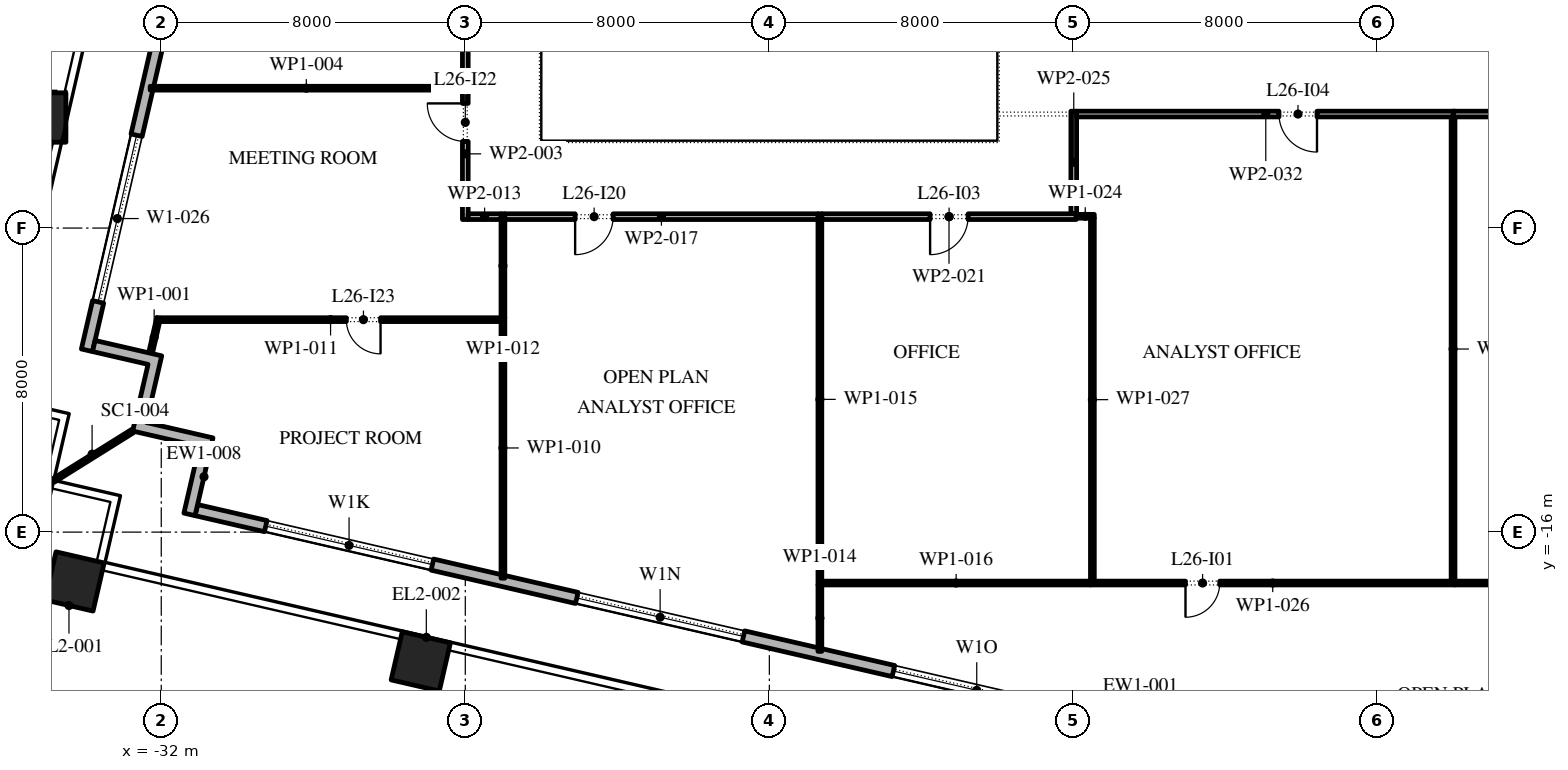
"""IFC4 building model, lengths in metres.
Left out: names, types, materials, properties, quantities, classifications, styles, units other than length and angle.
Written with IfcOpenShell. Run it as: python <this file> out.ifc"""

import sys

from ifc_helpers import new_model, si_unit, direction, frame, frame_2d, origin, origin_2d, place, context, subcontext, project, spatial, polyline, rectangle, outline, extrude, element, fill, save


model = new_model("IFC4")
c1 = context("Model", 3, precision=1e-05, world=origin(), true_north=direction((0.0, 1.0)))
c2 = subcontext(c1, "Body", "Model", "MODEL_VIEW")
j1 = project(units=[si_unit("LENGTHUNIT", "METRE"), si_unit("PLANEANGLEUNIT", "RADIAN")], contexts=[c1])
p1 = place(None, origin())
s1 = spatial("IfcSite", under=j1, at=p1, CompositionType="ELEMENT")
p2 = place(p1, origin())
s2 = spatial("IfcBuilding", under=s1, at=p2, CompositionType="ELEMENT")
p3 = place(p2, frame((0.0, 0.0, 122.4)))
s3 = spatial("IfcBuildingStorey", under=s2, at=p3, CompositionType="ELEMENT", Elevation=122.4)
for number, where, z_axis, x_axis in (
    (1, (-34.282, -17.298, 0.0), (0.0, 0.0, 1.0), (0.974, -0.225, 0.0)),
    (2, (-25.172, -19.402, 0.0), (0.0, 0.0, 1.0), (0.974, -0.225, 0.0)),
):
    element("IfcColumn", number, at=place(p3, frame(where, z_axis=z_axis, x_axis=x_axis)), inside=s3, PredefinedType="COLUMN", context=c2, shape_type="SweptSolid", body=[
        extrude(rectangle(XDim=1.3, YDim=1.3, at=origin_2d()), origin(), (0.0, 0.0, 1.0), 4.2),
    ])
p4 = place(p3, frame((-35.159, -5.092, 0.0), z_axis=(0.00290605529, 0.012670401066, 0.99991550432), x_axis=(-0.974691740237, 0.22355315143, 0.0)))
e3 = element("IfcColumn", 3, at=p4, inside=s3, PredefinedType="COLUMN", context=c2, shape_type="SweptSolid", body=[
    extrude(rectangle(XDim=1.3, YDim=1.3, at=origin_2d()), origin(), (0.0, 0.0, 1.0), 4.2),
])
p5 = place(p3, frame((-35.631, -15.139, 0.0), z_axis=(0.0, 0.0, 1.0), x_axis=(0.974370064785, -0.224951054344, 0.0)))
e4 = element("IfcColumn", 4, at=p5, inside=s3, PredefinedType="COLUMN", context=c2, shape_type="SweptSolid", body=[
    extrude(rectangle(XDim=1.3, YDim=1.3, at=origin_2d()), origin(), (0.0, 0.0, 1.0), 4.2),
])
p6 = place(p3, frame((-31.078, -15.421, 0.0), z_axis=(0.0, 0.0, 1.0), x_axis=(0.974370456532, -0.224949357493, 0.0)))
e5 = element("IfcWall", 5, at=p6, inside=s3, PredefinedType="STANDARD", context=c2, shape_type="SweptSolid", body=[
    extrude(rectangle(XDim=51.0, YDim=0.3, at=frame_2d((25.5, 0.0))), origin(), (0.0, 0.0, 1.0), 4.0),
])
p7 = place(p6, frame((1.875, 0.0, 0.45)))
e6 = element("IfcOpeningElement", 6, at=p7, cuts=e5, PredefinedType="OPENING", context=c2, shape_type="SweptSolid", body=[
    extrude(rectangle(XDim=4.5, YDim=2.65, at=frame_2d((2.25, 1.325))), frame((0.0, 0.16, 0.0), z_axis=(0.0, -1.0, 0.0), x_axis=(1.0, 0.0, 0.0)), (0.0, 0.0, 1.0), 0.32),
])
p8 = place(p6, frame((10.275, 0.0, 0.45)))
e7 = element("IfcOpeningElement", 7, at=p8, cuts=e5, PredefinedType="OPENING", context=c2, shape_type="SweptSolid", body=[
    extrude(rectangle(XDim=4.5, YDim=2.525, at=frame_2d((2.25, 1.262))), frame((0.0, 0.16, 0.0), z_axis=(0.0, -1.0, 0.0), x_axis=(1.0, 0.0, 0.0)), (0.0, 0.0, 1.0), 0.32),
])
p9 = place(p6, frame((18.825, 0.0, 0.45)))
e8 = element("IfcOpeningElement", 8, at=p9, cuts=e5, PredefinedType="OPENING", context=c2, shape_type="SweptSolid", body=[
    extrude(rectangle(XDim=4.5, YDim=2.5, at=frame_2d((2.25, 1.25))), frame((0.0, 0.16, 0.0), z_axis=(0.0, -1.0, 0.0), x_axis=(1.0, 0.0, 0.0)), (0.0, 0.0, 1.0), 0.32),
])
p10 = place(p6, frame((28.425, 0.0, 0.0)))
e9 = element("IfcOpeningElement", 9, at=p10, cuts=e5, PredefinedType="OPENING", context=c2, shape_type="SweptSolid", body=[
    extrude(rectangle(XDim=2.4, YDim=2.9, at=frame_2d((1.2, 1.45))), frame((0.0, 0.16, 0.0), z_axis=(0.0, -1.0, 0.0), x_axis=(1.0, 0.0, 0.0)), (0.0, 0.0, 1.0), 0.32),
])
p11 = place(p6, frame((35.925, 0.0, 0.45)))
e10 = element("IfcOpeningElement", 10, at=p11, cuts=e5, PredefinedType="OPENING", context=c2, shape_type="SweptSolid", body=[
    extrude(rectangle(XDim=4.5, YDim=2.45, at=frame_2d((2.25, 1.225))), frame((0.0, 0.16, 0.0), z_axis=(0.0, -1.0, 0.0), x_axis=(1.0, 0.0, 0.0)), (0.0, 0.0, 1.0), 0.32),
])
p12 = place(p6, frame((44.475, 0.0, 0.45)))
e11 = element("IfcOpeningElement", 11, at=p12, cuts=e5, PredefinedType="OPENING", context=c2, shape_type="SweptSolid", body=[
    extrude(rectangle(XDim=4.5, YDim=2.45, at=frame_2d((2.25, 1.225))), frame((0.0, 0.16, 0.0), z_axis=(0.0, -1.0, 0.0), x_axis=(1.0, 0.0, 0.0)), (0.0, 0.0, 1.0), 0.32),
])
p13 = place(p3, frame((-22.82, 37.016, 0.0), z_axis=(0.0, 0.0, 1.0), x_axis=(-0.224953880882, -0.974369412223, 0.0)))
e12 = element("IfcWall", 12, at=p13, inside=s3, PredefinedType="STANDARD", context=c2, shape_type="SweptSolid", body=[
    extrude(rectangle(XDim=49.5, YDim=0.3, at=frame_2d((24.75, 0.0))), origin(), (0.0, 0.0, 1.0), 4.0),
])
p14 = place(p13, frame((1.157, 0.0, 0.45)))
e13 = element("IfcOpeningElement", 13, at=p14, cuts=e12, PredefinedType="OPENING", context=c2, shape_type="SweptSolid", body=[
    extrude(rectangle(XDim=4.5, YDim=3.05, at=frame_2d((2.25, 1.525))), frame((0.0, 0.16, 0.0), z_axis=(0.0, -1.0, 0.0), x_axis=(1.0, 0.0, 0.0)), (0.0, 0.0, 1.0), 0.32),
])
p15 = place(p13, frame((8.121, 0.0, 0.45)))
e14 = element("IfcOpeningElement", 14, at=p15, cuts=e12, PredefinedType="OPENING", context=c2, shape_type="SweptSolid", body=[
    extrude(rectangle(XDim=4.5, YDim=3.05, at=frame_2d((2.25, 1.525))), frame((0.0, 0.16, 0.0), z_axis=(0.0, -1.0, 0.0), x_axis=(1.0, 0.0, 0.0)), (0.0, 0.0, 1.0), 0.32),
])
p16 = place(p13, frame((15.236, 0.0, 0.45)))
e15 = element("IfcOpeningElement", 15, at=p16, cuts=e12, PredefinedType="OPENING", context=c2, shape_type="SweptSolid", body=[
    extrude(rectangle(XDim=4.5, YDim=3.05, at=frame_2d((2.25, 1.525))), frame((0.0, 0.16, 0.0), z_axis=(0.0, -1.0, 0.0), x_axis=(1.0, 0.0, 0.0)), (0.0, 0.0, 1.0), 0.32),
])
p17 = place(p13, frame((23.4, 0.0, 0.0)))
e16 = element("IfcOpeningElement", 16, at=p17, cuts=e12, PredefinedType="OPENING", context=c2, shape_type="SweptSolid", body=[
    extrude(rectangle(XDim=2.4, YDim=3.5, at=frame_2d((1.2, 1.75))), frame((0.0, 0.16, 0.0), z_axis=(0.0, -1.0, 0.0), x_axis=(1.0, 0.0, 0.0)), (0.0, 0.0, 1.0), 0.32),
])
p18 = place(p13, frame((29.464, 0.0, 0.45)))
e17 = element("IfcOpeningElement", 17, at=p18, cuts=e12, PredefinedType="OPENING", context=c2, shape_type="SweptSolid", body=[
    extrude(rectangle(XDim=4.5, YDim=2.875, at=frame_2d((2.25, 1.438))), frame((0.0, 0.16, 0.0), z_axis=(0.0, -1.0, 0.0), x_axis=(1.0, 0.0, 0.0)), (0.0, 0.0, 1.0), 0.32),
])
p19 = place(p13, frame((36.579, 0.0, 0.45)))
e18 = element("IfcOpeningElement", 18, at=p19, cuts=e12, PredefinedType="OPENING", context=c2, shape_type="SweptSolid", body=[
    extrude(rectangle(XDim=4.5, YDim=2.675, at=frame_2d((2.25, 1.337))), frame((0.0, 0.16, 0.0), z_axis=(0.0, -1.0, 0.0), x_axis=(1.0, 0.0, 0.0)), (0.0, 0.0, 1.0), 0.32),
])
p20 = place(p13, frame((43.693, 0.0, 0.45)))
e19 = element("IfcOpeningElement", 19, at=p20, cuts=e12, PredefinedType="OPENING", context=c2, shape_type="SweptSolid", body=[
    extrude(rectangle(XDim=4.5, YDim=3.05, at=frame_2d((2.25, 1.525))), frame((0.0, 0.16, 0.0), z_axis=(0.0, -1.0, 0.0), x_axis=(1.0, 0.0, 0.0)), (0.0, 0.0, 1.0), 0.32),
])
p21 = place(p3, origin())
e20 = element("IfcWall", 20, at=p21, inside=s3, PredefinedType="STANDARD", context=c2, shape_type="SweptSolid", body=[
    extrude(outline(polyline([(-32.393, -13.116), (-30.639, -13.521), (-31.111, -15.567), (-31.404, -15.5), (-30.999, -13.746), (-32.753, -13.341), (-32.348, -11.587), (-33.809, -11.25), (-33.742, -10.957), (-31.988, -11.362), (-32.393, -13.116)])), origin(), (0.0, 0.0, 1.0), 4.0),
])
p22 = place(p3, frame((-32.753, -13.341, -0.05), z_axis=(0.0, 0.0, 1.0), x_axis=(-0.848059759764, -0.529900598103, 0.0)))
e21 = element("IfcWall", 21, at=p22, inside=s3, PredefinedType="STANDARD", context=c2, shape_type="SweptSolid", body=[
    extrude(rectangle(XDim=2.455, YDim=0.1, at=frame_2d((1.228, 0.0))), origin(), (0.0, 0.0, 1.0), 4.05),
])
p23 = place(p3, frame((-32.069, -10.361, 0.0), z_axis=(0.0, 0.0, 1.0), x_axis=(-0.222987762652, -0.974821243976, 0.0)))
e22 = element("IfcWall", 22, at=p23, inside=s3, PredefinedType="PARTITIONING", context=c2, shape_type="SweptSolid", body=[
    extrude(rectangle(XDim=1.058, YDim=0.1, at=frame_2d((0.529, 0.0))), origin(), (0.0, 0.0, 1.0), 4.0),
])
p24 = place(p3, frame((-24.0, -7.775, 0.0), z_axis=(0.0, 0.0, 1.0), x_axis=(0.0, 1.0, 0.0)))
e23 = element("IfcWall", 23, at=p24, inside=s3, PredefinedType="PARTITIONING", context=c2, shape_type="SweptSolid", body=[
    extrude(rectangle(XDim=3.455, YDim=0.15, at=frame_2d((1.728, 0.0))), origin(), (0.0, 0.0, 1.0), 4.0),
])
p25 = place(p24, frame((2.055, 0.0, 0.0)))
e24 = element("IfcOpeningElement", 24, at=p25, cuts=e23, PredefinedType="OPENING", context=c2, shape_type="SweptSolid", body=[
    extrude(rectangle(XDim=1.0, YDim=2.1, at=frame_2d((0.5, 1.05))), frame((0.0, 0.085, 0.0), z_axis=(0.0, -1.0, 0.0), x_axis=(1.0, 0.0, 0.0)), (0.0, 0.0, 1.0), 0.17),
])
p26 = place(p3, frame((-24.075, -4.32, 0.0), z_axis=(0.0, 0.0, 1.0), x_axis=(-1.0, 0.0, 0.0)))
e25 = element("IfcWall", 25, at=p26, inside=s3, PredefinedType="PARTITIONING", context=c2, shape_type="SweptSolid", body=[
    extrude(rectangle(XDim=8.217, YDim=0.1, at=frame_2d((4.108, 0.0))), origin(), (0.0, 0.0, 1.0), 4.0),
])
p27 = place(p3, frame((-24.0, -4.32, 0.0), z_axis=(0.0, 0.0, 1.0), x_axis=(0.0, 1.0, 0.0)))
e26 = element("IfcWall", 26, at=p27, inside=s3, PredefinedType="PARTITIONING", context=c2, shape_type="SweptSolid", body=[
    extrude(rectangle(XDim=7.82, YDim=0.15, at=frame_2d((3.91, 0.0))), origin(), (0.0, 0.0, 1.0), 4.0),
])
p28 = place(p27, frame((4.12, 0.0, 0.0)))
e27 = element("IfcOpeningElement", 27, at=p28, cuts=e26, PredefinedType="OPENING", context=c2, shape_type="SweptSolid", body=[
    extrude(rectangle(XDim=1.0, YDim=2.1, at=frame_2d((0.5, 1.05))), frame((0.0, 0.085, 0.0), z_axis=(0.0, -1.0, 0.0), x_axis=(1.0, 0.0, 0.0)), (0.0, 0.0, 1.0), 0.17),
])
p29 = place(p3, frame((-23.01, -17.212, 0.0), z_axis=(0.0, 0.0, 1.0), x_axis=(0.0, 1.0, 0.0)))
e28 = element("IfcWall", 28, at=p29, inside=s3, PredefinedType="PARTITIONING", context=c2, shape_type="SweptSolid", body=[
    extrude(rectangle(XDim=6.852, YDim=0.1, at=frame_2d((3.426, 0.0))), origin(), (0.0, 0.0, 1.0), 4.0),
])
p30 = place(p3, frame((-23.06, -10.41, 0.0), z_axis=(0.0, 0.0, 1.0), x_axis=(-1.0, 0.0, 0.0)))
e29 = element("IfcWall", 29, at=p30, inside=s3, PredefinedType="PARTITIONING", context=c2, shape_type="SweptSolid", body=[
    extrude(rectangle(XDim=8.97, YDim=0.1, at=frame_2d((4.485, 0.0))), origin(), (0.0, 0.0, 1.0), 4.0),
])
p31 = place(p30, frame((3.17, 0.0, 0.0)))
e30 = element("IfcOpeningElement", 30, at=p31, cuts=e29, PredefinedType="OPENING", context=c2, shape_type="SweptSolid", body=[
    extrude(rectangle(XDim=0.9, YDim=2.1, at=frame_2d((0.45, 1.05))), frame((0.0, 0.06, 0.0), z_axis=(0.0, -1.0, 0.0), x_axis=(1.0, 0.0, 0.0)), (0.0, 0.0, 1.0), 0.12),
])
p32 = place(p3, frame((-23.01, -10.36, 0.0), z_axis=(0.0, 0.0, 1.0), x_axis=(0.0, 1.0, 0.0)))
e31 = element("IfcWall", 31, at=p32, inside=s3, PredefinedType="PARTITIONING", context=c2, shape_type="SweptSolid", body=[
    extrude(rectangle(XDim=2.735, YDim=0.1, at=frame_2d((1.368, 0.0))), origin(), (0.0, 0.0, 1.0), 4.0),
])
p33 = place(p3, frame((-23.06, -7.7, 0.0), z_axis=(0.0, 0.0, 1.0), x_axis=(-1.0, 0.0, 0.0)))
e32 = element("IfcWall", 32, at=p33, inside=s3, PredefinedType="PARTITIONING", context=c2, shape_type="SweptSolid", body=[
    extrude(rectangle(XDim=0.865, YDim=0.15, at=frame_2d((0.433, 0.0))), origin(), (0.0, 0.0, 1.0), 4.0),
])
p34 = place(p3, frame((-14.67, -19.138, 0.0), z_axis=(0.0, 0.0, 1.0), x_axis=(0.0, 1.0, 0.0)))
e33 = element("IfcWall", 33, at=p34, inside=s3, PredefinedType="PARTITIONING", context=c2, shape_type="SweptSolid", body=[
    extrude(rectangle(XDim=1.748, YDim=0.1, at=frame_2d((0.874, 0.0))), origin(), (0.0, 0.0, 1.0), 4.0),
])
p35 = place(p3, frame((-14.67, -17.39, 0.0), z_axis=(0.0, 0.0, 1.0), x_axis=(0.0, 1.0, 0.0)))
e34 = element("IfcWall", 34, at=p35, inside=s3, PredefinedType="PARTITIONING", context=c2, shape_type="SweptSolid", body=[
    extrude(rectangle(XDim=9.765, YDim=0.1, at=frame_2d((4.882, 0.0))), origin(), (0.0, 0.0, 1.0), 4.0),
])
p36 = place(p3, frame((-14.62, -17.34, 0.0), z_axis=(0.0, 0.0, 1.0), x_axis=(1.0, 0.0, 0.0)))
e35 = element("IfcWall", 35, at=p36, inside=s3, PredefinedType="PARTITIONING", context=c2, shape_type="SweptSolid", body=[
    extrude(rectangle(XDim=7.07, YDim=0.1, at=frame_2d((3.535, 0.0))), origin(), (0.0, 0.0, 1.0), 4.0),
])
p37 = place(p3, frame((-14.72, -7.7, 0.0), z_axis=(0.0, 0.0, 1.0), x_axis=(-1.0, 0.0, 0.0)))
e36 = element("IfcWall", 36, at=p37, inside=s3, PredefinedType="PARTITIONING", context=c2, shape_type="SweptSolid", body=[
    extrude(rectangle(XDim=8.24, YDim=0.15, at=frame_2d((4.12, 0.0))), origin(), (0.0, 0.0, 1.0), 4.0),
])
p38 = place(p37, frame((5.39, 0.0, 0.0)))
e37 = element("IfcOpeningElement", 37, at=p38, cuts=e36, PredefinedType="OPENING", context=c2, shape_type="SweptSolid", body=[
    extrude(rectangle(XDim=1.0, YDim=2.1, at=frame_2d((0.5, 1.05))), frame((0.0, 0.085, 0.0), z_axis=(0.0, -1.0, 0.0), x_axis=(1.0, 0.0, 0.0)), (0.0, 0.0, 1.0), 0.17),
])
p39 = place(p3, frame((-7.925, -7.7, 0.0), z_axis=(0.0, 0.0, 1.0), x_axis=(-1.0, 0.0, 0.0)))
e38 = element("IfcWall", 38, at=p39, inside=s3, PredefinedType="PARTITIONING", context=c2, shape_type="SweptSolid", body=[
    extrude(rectangle(XDim=6.695, YDim=0.15, at=frame_2d((3.348, 0.0))), origin(), (0.0, 0.0, 1.0), 4.0),
])
p40 = place(p39, frame((2.845, 0.0, 0.0)))
e39 = element("IfcOpeningElement", 39, at=p40, cuts=e38, PredefinedType="OPENING", context=c2, shape_type="SweptSolid", body=[
    extrude(rectangle(XDim=1.0, YDim=2.1, at=frame_2d((0.5, 1.05))), frame((0.0, 0.085, 0.0), z_axis=(0.0, -1.0, 0.0), x_axis=(1.0, 0.0, 0.0)), (0.0, 0.0, 1.0), 0.17),
])
p41 = place(p3, frame((-7.925, -7.69, 0.0), z_axis=(0.0, 0.0, 1.0), x_axis=(1.0, 0.0, 0.0)))
e40 = element("IfcWall", 40, at=p41, inside=s3, PredefinedType="PARTITIONING", context=c2, shape_type="SweptSolid", body=[
    extrude(rectangle(XDim=0.475, YDim=0.1, at=frame_2d((0.238, 0.0))), origin(), (0.0, 0.0, 1.0), 4.0),
])
p42 = place(p3, frame((-7.99, -4.925, 0.0), z_axis=(0.0, 0.0, 1.0), x_axis=(0.0, -1.0, 0.0)))
e41 = element("IfcWall", 41, at=p42, inside=s3, PredefinedType="PARTITIONING", context=c2, shape_type="SweptSolid", body=[
    extrude(rectangle(XDim=2.69, YDim=0.15, at=frame_2d((1.345, 0.0))), origin(), (0.0, 0.0, 1.0), 4.0),
])
p43 = place(p3, frame((-7.55, -17.34, 0.0), z_axis=(0.0, 0.0, 1.0), x_axis=(1.0, 0.0, 0.0)))
e42 = element("IfcWall", 42, at=p43, inside=s3, PredefinedType="PARTITIONING", context=c2, shape_type="SweptSolid", body=[
    extrude(rectangle(XDim=9.59, YDim=0.1, at=frame_2d((4.795, 0.0))), origin(), (0.0, 0.0, 1.0), 4.0),
])
p44 = place(p43, frame((2.5, 0.0, 0.0)))
e43 = element("IfcOpeningElement", 43, at=p44, cuts=e42, PredefinedType="OPENING", context=c2, shape_type="SweptSolid", body=[
    extrude(rectangle(XDim=0.9, YDim=2.1, at=frame_2d((0.45, 1.05))), frame((0.0, 0.06, 0.0), z_axis=(0.0, -1.0, 0.0), x_axis=(1.0, 0.0, 0.0)), (0.0, 0.0, 1.0), 0.12),
])
p45 = place(p3, frame((-7.5, -7.74, 0.0), z_axis=(0.0, 0.0, 1.0), x_axis=(0.0, -1.0, 0.0)))
e44 = element("IfcWall", 44, at=p45, inside=s3, PredefinedType="PARTITIONING", context=c2, shape_type="SweptSolid", body=[
    extrude(rectangle(XDim=9.55, YDim=0.1, at=frame_2d((4.775, 0.0))), origin(), (0.0, 0.0, 1.0), 4.0),
])
p46 = place(p3, frame((2.04, -17.34, 0.0), z_axis=(0.0, 0.0, 1.0), x_axis=(1.0, 0.0, 0.0)))
e45 = element("IfcWall", 45, at=p46, inside=s3, PredefinedType="PARTITIONING", context=c2, shape_type="SweptSolid", body=[
    extrude(rectangle(XDim=8.33, YDim=0.1, at=frame_2d((4.165, 0.0))), origin(), (0.0, 0.0, 1.0), 4.0),
])
p47 = place(p3, frame((2.04, -5.0, 0.0), z_axis=(0.0, 0.0, 1.0), x_axis=(-1.0, 0.0, 0.0)))
e46 = element("IfcWall", 46, at=p47, inside=s3, PredefinedType="PARTITIONING", context=c2, shape_type="SweptSolid", body=[
    extrude(rectangle(XDim=9.955, YDim=0.15, at=frame_2d((4.978, 0.0))), origin(), (0.0, 0.0, 1.0), 4.0),
])
p48 = place(p47, frame((3.63, 0.0, 0.0)))
e47 = element("IfcOpeningElement", 47, at=p48, cuts=e46, PredefinedType="OPENING", context=c2, shape_type="SweptSolid", body=[
    extrude(rectangle(XDim=1.0, YDim=2.1, at=frame_2d((0.5, 1.05))), frame((0.0, 0.085, 0.0), z_axis=(0.0, -1.0, 0.0), x_axis=(1.0, 0.0, 0.0)), (0.0, 0.0, 1.0), 0.17),
])
p49 = place(p3, frame((1.99, -5.075, 0.0), z_axis=(0.0, 0.0, 1.0), x_axis=(0.0, -1.0, 0.0)))
e48 = element("IfcWall", 48, at=p49, inside=s3, PredefinedType="PARTITIONING", context=c2, shape_type="SweptSolid", body=[
    extrude(rectangle(XDim=12.215, YDim=0.1, at=frame_2d((6.107, 0.0))), origin(), (0.0, 0.0, 1.0), 4.0),
])
p50 = place(p3, frame((7.925, -5.0, 0.0), z_axis=(0.0, 0.0, 1.0), x_axis=(-1.0, 0.0, 0.0)))
e49 = element("IfcWall", 49, at=p50, inside=s3, PredefinedType="PARTITIONING", context=c2, shape_type="SweptSolid", body=[
    extrude(rectangle(XDim=5.935, YDim=0.15, at=frame_2d((2.968, 0.0))), origin(), (0.0, 0.0, 1.0), 4.0),
])
p51 = place(p50, frame((2.535, 0.0, 0.0)))
e50 = element("IfcOpeningElement", 50, at=p51, cuts=e49, PredefinedType="OPENING", context=c2, shape_type="SweptSolid", body=[
    extrude(rectangle(XDim=1.0, YDim=2.1, at=frame_2d((0.5, 1.05))), frame((0.0, 0.085, 0.0), z_axis=(0.0, -1.0, 0.0), x_axis=(1.0, 0.0, 0.0)), (0.0, 0.0, 1.0), 0.17),
])
p52 = place(p7, origin())
e51 = element("IfcWindow", 51, at=p52, inside=s3, PartitioningType="DOUBLE_PANEL_VERTICAL", PredefinedType="WINDOW", context=c2, shape_type="SweptSolid", body=[
    extrude(rectangle(XDim=4.5, YDim=2.65, at=frame_2d((2.25, 1.325))), frame((0.0, 0.03, 0.0), z_axis=(0.0, -1.0, 0.0), x_axis=(1.0, 0.0, 0.0)), (0.0, 0.0, 1.0), 0.06),
])
fill(e6, e51)
p53 = place(p8, origin())
e52 = element("IfcWindow", 52, at=p53, inside=s3, PartitioningType="DOUBLE_PANEL_VERTICAL", PredefinedType="WINDOW", context=c2, shape_type="SweptSolid", body=[
    extrude(rectangle(XDim=4.5, YDim=2.525, at=frame_2d((2.25, 1.262))), frame((0.0, 0.03, 0.0), z_axis=(0.0, -1.0, 0.0), x_axis=(1.0, 0.0, 0.0)), (0.0, 0.0, 1.0), 0.06),
])
fill(e7, e52)
p54 = place(p9, origin())
e53 = element("IfcWindow", 53, at=p54, inside=s3, PartitioningType="DOUBLE_PANEL_VERTICAL", PredefinedType="WINDOW", context=c2, shape_type="SweptSolid", body=[
    extrude(rectangle(XDim=4.5, YDim=2.5, at=frame_2d((2.25, 1.25))), frame((0.0, 0.03, 0.0), z_axis=(0.0, -1.0, 0.0), x_axis=(1.0, 0.0, 0.0)), (0.0, 0.0, 1.0), 0.06),
])
fill(e8, e53)
p55 = place(p20, origin())
e54 = element("IfcWindow", 54, at=p55, inside=s3, PartitioningType="DOUBLE_PANEL_VERTICAL", PredefinedType="WINDOW", context=c2, shape_type="SweptSolid", body=[
    extrude(rectangle(XDim=4.5, YDim=3.05, at=frame_2d((2.25, 1.525))), frame((0.0, 0.03, 0.0), z_axis=(0.0, -1.0, 0.0), x_axis=(1.0, 0.0, 0.0)), (0.0, 0.0, 1.0), 0.06),
])
fill(e19, e54)
p56 = place(p44, frame((0.9, 0.0, 0.0), z_axis=(0.0, 0.0, 1.0), x_axis=(-1.0, 0.0, 0.0)))
e55 = element("IfcDoor", 55, at=p56, inside=s3, OperationType="SINGLE_SWING_LEFT", PredefinedType="DOOR", context=c2, shape_type="SweptSolid", body=[
    extrude(rectangle(XDim=0.9, YDim=2.1, at=frame_2d((0.45, 1.05))), frame((0.0, 0.025, 0.0), z_axis=(0.0, -1.0, 0.0), x_axis=(1.0, 0.0, 0.0)), (0.0, 0.0, 1.0), 0.05),
])
fill(e43, e55)
p57 = place(p40, origin())
e56 = element("IfcDoor", 56, at=p57, inside=s3, OperationType="SINGLE_SWING_LEFT", PredefinedType="DOOR", context=c2, shape_type="SweptSolid", body=[
    extrude(rectangle(XDim=1.0, YDim=2.1, at=frame_2d((0.5, 1.05))), frame((0.0, 0.025, 0.0), z_axis=(0.0, -1.0, 0.0), x_axis=(1.0, 0.0, 0.0)), (0.0, 0.0, 1.0), 0.05),
])
fill(e39, e56)
p58 = place(p48, origin())
e57 = element("IfcDoor", 57, at=p58, inside=s3, OperationType="SINGLE_SWING_RIGHT", PredefinedType="DOOR", context=c2, shape_type="SweptSolid", body=[
    extrude(rectangle(XDim=1.0, YDim=2.1, at=frame_2d((0.5, 1.05))), frame((0.0, 0.025, 0.0), z_axis=(0.0, -1.0, 0.0), x_axis=(1.0, 0.0, 0.0)), (0.0, 0.0, 1.0), 0.05),
])
fill(e47, e57)
p59 = place(p38, origin())
e58 = element("IfcDoor", 58, at=p59, inside=s3, OperationType="SINGLE_SWING_LEFT", PredefinedType="DOOR", context=c2, shape_type="SweptSolid", body=[
    extrude(rectangle(XDim=1.0, YDim=2.1, at=frame_2d((0.5, 1.05))), frame((0.0, 0.025, 0.0), z_axis=(0.0, -1.0, 0.0), x_axis=(1.0, 0.0, 0.0)), (0.0, 0.0, 1.0), 0.05),
])
fill(e37, e58)
p60 = place(p25, origin())
e59 = element("IfcDoor", 59, at=p60, inside=s3, OperationType="SINGLE_SWING_LEFT", PredefinedType="DOOR", context=c2, shape_type="SweptSolid", body=[
    extrude(rectangle(XDim=1.0, YDim=2.1, at=frame_2d((0.5, 1.05))), frame((0.0, 0.025, 0.0), z_axis=(0.0, -1.0, 0.0), x_axis=(1.0, 0.0, 0.0)), (0.0, 0.0, 1.0), 0.05),
])
fill(e24, e59)
p61 = place(p31, origin())
e60 = element("IfcDoor", 60, at=p61, inside=s3, OperationType="SINGLE_SWING_RIGHT", PredefinedType="DOOR", context=c2, shape_type="SweptSolid", body=[
    extrude(rectangle(XDim=0.9, YDim=2.1, at=frame_2d((0.45, 1.05))), frame((0.0, 0.025, 0.0), z_axis=(0.0, -1.0, 0.0), x_axis=(1.0, 0.0, 0.0)), (0.0, 0.0, 1.0), 0.05),
])
fill(e30, e60)
save(model, sys.argv[1])
